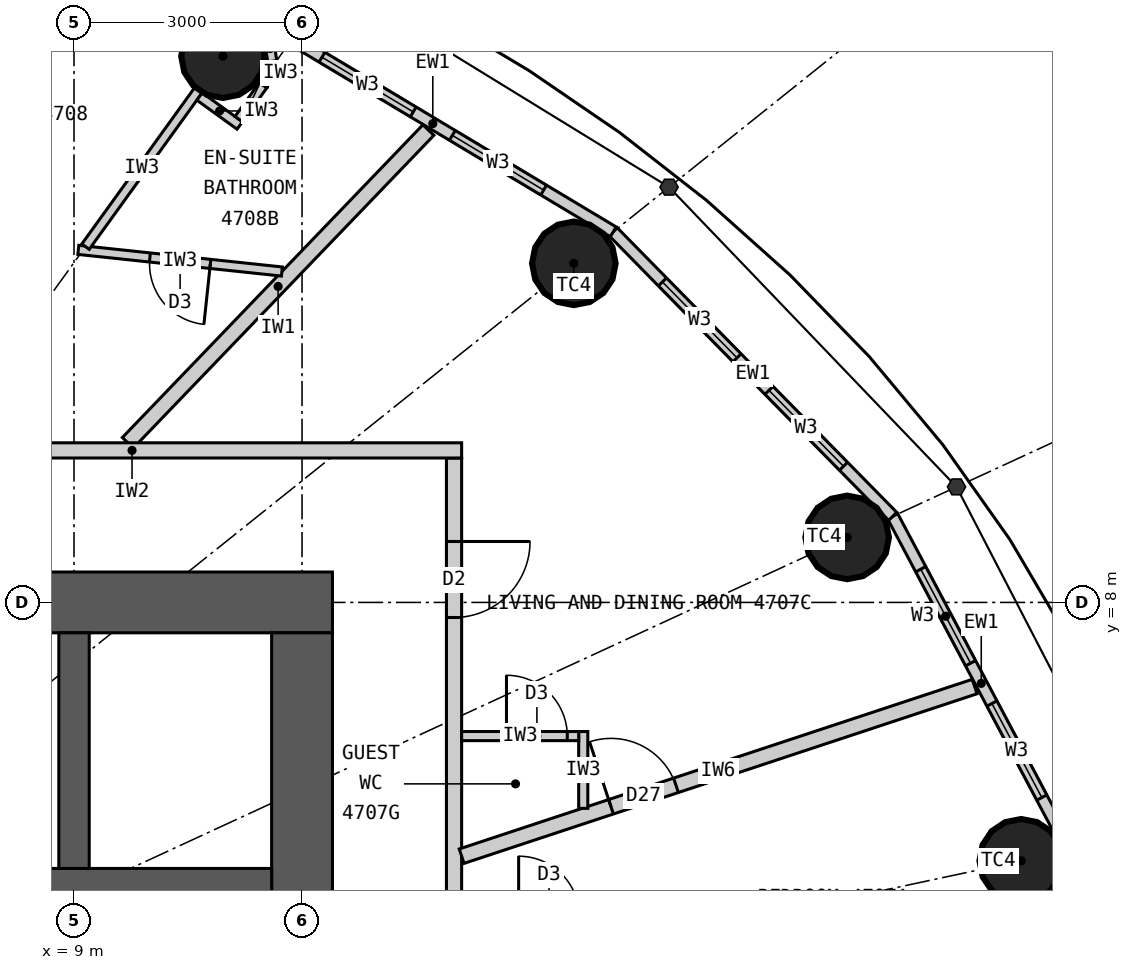
"""IFC4 building model, lengths in metres.
Left out: names, types, materials, properties, quantities, classifications, styles, units other than length and angle.
Written with IfcOpenShell. Run it as: python <this file> out.ifc"""

import sys

from ifc_helpers import new_model, si_unit, direction, frame, frame_2d, origin, origin_2d, place, context, subcontext, project, spatial, rectangle, circle, extrude, element, fill, save


model = new_model("IFC4")
c1 = context("Model", 3, precision=1e-05, world=origin(), true_north=direction((0.0, 1.0)))
c2 = subcontext(c1, "Body", "Model", "MODEL_VIEW")
j1 = project(units=[si_unit("LENGTHUNIT", "METRE"), si_unit("PLANEANGLEUNIT", "RADIAN")], contexts=[c1])
p1 = place(None, origin())
s1 = spatial("IfcSite", under=j1, at=p1, CompositionType="ELEMENT")
p2 = place(p1, origin())
s2 = spatial("IfcBuilding", under=s1, at=p2, CompositionType="ELEMENT")
p3 = place(p2, frame((0.0, 0.0, 176.4)))
s3 = spatial("IfcBuildingStorey", under=s2, at=p3, CompositionType="ELEMENT", Elevation=176.4)
for number, where, z_axis, x_axis in (
    (1, (21.463, 4.601, 0.0), (0.0, 0.0, 1.0), (1.0, 0.0, 0.0)),
    (2, (19.172, 8.855, 0.0), (0.0, 0.0, 1.0), (1.0, 0.0, 0.0)),
    (3, (15.576, 12.461, 0.0), (0.0, 0.0, 1.0), (1.0, 0.0, 0.0)),
    (4, (10.96, 15.186, 0.0), (0.0, 0.0, 1.0), (1.0, 0.0, 0.0)),
):
    element("IfcColumn", number, at=place(p3, frame(where, z_axis=z_axis, x_axis=x_axis)), inside=s3, PredefinedType="COLUMN", context=c2, shape_type="SweptSolid", body=[
        extrude(circle(Radius=0.55, at=origin_2d()), origin(), (0.0, 0.0, 1.0), 3.3),
    ])
p4 = place(p3, frame((-12.4, 8.0, 0.0), z_axis=(0.0, 0.0, 1.0), x_axis=(1.0, 0.0, 0.0)))
e5 = element("IfcWall", 5, at=p4, inside=s3, PredefinedType="SHEAR", context=c2, shape_type="SweptSolid", body=[
    extrude(rectangle(XDim=24.8, YDim=0.8, at=frame_2d((12.4, 0.0))), origin(), (0.0, 0.0, 1.0), 3.3),
])
p5 = place(p4, frame((11.1, 0.0, 0.0)))
e6 = element("IfcOpeningElement", 6, at=p5, cuts=e5, PredefinedType="OPENING", context=c2, shape_type="SweptSolid", body=[
    extrude(rectangle(XDim=1.2, YDim=2.2, at=frame_2d((0.6, 1.1))), frame((0.0, 0.41, 0.0), z_axis=(0.0, -1.0, 0.0), x_axis=(1.0, 0.0, 0.0)), (0.0, 0.0, 1.0), 0.82),
])
p6 = place(p4, frame((18.7, 0.0, 0.0)))
e7 = element("IfcOpeningElement", 7, at=p6, cuts=e5, PredefinedType="OPENING", context=c2, shape_type="SweptSolid", body=[
    extrude(rectangle(XDim=0.9, YDim=2.2, at=frame_2d((0.45, 1.1))), frame((0.0, 0.41, 0.0), z_axis=(0.0, -1.0, 0.0), x_axis=(1.0, 0.0, 0.0)), (0.0, 0.0, 1.0), 0.82),
])
p7 = place(p3, frame((12.0, -7.6, 0.0), z_axis=(0.0, 0.0, 1.0), x_axis=(0.0, 1.0, 0.0)))
e8 = element("IfcWall", 8, at=p7, inside=s3, PredefinedType="SHEAR", context=c2, shape_type="SweptSolid", body=[
    extrude(rectangle(XDim=15.2, YDim=0.8, at=frame_2d((7.6, 0.0))), origin(), (0.0, 0.0, 1.0), 3.3),
])
p8 = place(p7, frame((6.7, 0.0, 0.0)))
e9 = element("IfcOpeningElement", 9, at=p8, cuts=e8, PredefinedType="OPENING", context=c2, shape_type="SweptSolid", body=[
    extrude(rectangle(XDim=1.8, YDim=2.2, at=frame_2d((0.9, 1.1))), frame((0.0, 0.41, 0.0), z_axis=(0.0, -1.0, 0.0), x_axis=(1.0, 0.0, 0.0)), (0.0, 0.0, 1.0), 0.82),
])
p9 = place(p3, frame((-11.6, 4.3, 0.0), z_axis=(0.0, 0.0, 1.0), x_axis=(1.0, 0.0, 0.0)))
e10 = element("IfcWall", 10, at=p9, inside=s3, PredefinedType="SHEAR", context=c2, shape_type="SweptSolid", body=[
    extrude(rectangle(XDim=23.2, YDim=0.4, at=frame_2d((11.6, 0.0))), origin(), (0.0, 0.0, 1.0), 3.3),
])
p10 = place(p3, frame((9.0, 4.5, 0.0), z_axis=(0.0, 0.0, 1.0), x_axis=(0.0, 1.0, 0.0)))
e11 = element("IfcWall", 11, at=p10, inside=s3, PredefinedType="SHEAR", context=c2, shape_type="SweptSolid", body=[
    extrude(rectangle(XDim=3.1, YDim=0.4, at=frame_2d((1.55, 0.0))), origin(), (0.0, 0.0, 1.0), 3.3),
])
p11 = place(p3, frame((22.102, 4.738, 0.0), z_axis=(0.0, 0.0, 1.0), x_axis=(-0.468428906714, 0.883501193748, 0.0)))
e12 = element("IfcWall", 12, at=p11, inside=s3, PredefinedType="ELEMENTEDWALL", context=c2, shape_type="SweptSolid", body=[
    extrude(rectangle(XDim=4.974, YDim=0.15, at=frame_2d((2.487, 0.0))), origin(), (0.0, 0.0, 1.0), 3.12),
])
p12 = place(p11, frame((0.787, 0.0, 0.9)))
e13 = element("IfcOpeningElement", 13, at=p12, cuts=e12, PredefinedType="OPENING", context=c2, shape_type="SweptSolid", body=[
    extrude(rectangle(XDim=1.4, YDim=1.9, at=frame_2d((0.7, 0.95))), frame((0.0, 0.085, 0.0), z_axis=(0.0, -1.0, 0.0), x_axis=(1.0, 0.0, 0.0)), (0.0, 0.0, 1.0), 0.17),
])
p13 = place(p11, frame((2.787, 0.0, 0.9)))
e14 = element("IfcOpeningElement", 14, at=p13, cuts=e12, PredefinedType="OPENING", context=c2, shape_type="SweptSolid", body=[
    extrude(rectangle(XDim=1.4, YDim=1.9, at=frame_2d((0.7, 0.95))), frame((0.0, 0.085, 0.0), z_axis=(0.0, -1.0, 0.0), x_axis=(1.0, 0.0, 0.0)), (0.0, 0.0, 1.0), 0.17),
])
p14 = place(p3, frame((19.772, 9.132, 0.0), z_axis=(0.0, 0.0, 1.0), x_axis=(-0.700727467776, 0.71342905457, 0.0)))
e15 = element("IfcWall", 15, at=p14, inside=s3, PredefinedType="ELEMENTEDWALL", context=c2, shape_type="SweptSolid", body=[
    extrude(rectangle(XDim=5.247, YDim=0.15, at=frame_2d((2.624, 0.0))), origin(), (0.0, 0.0, 1.0), 3.12),
])
p15 = place(p14, frame((0.924, 0.0, 0.9)))
e16 = element("IfcOpeningElement", 16, at=p15, cuts=e15, PredefinedType="OPENING", context=c2, shape_type="SweptSolid", body=[
    extrude(rectangle(XDim=1.4, YDim=1.9, at=frame_2d((0.7, 0.95))), frame((0.0, 0.085, 0.0), z_axis=(0.0, -1.0, 0.0), x_axis=(1.0, 0.0, 0.0)), (0.0, 0.0, 1.0), 0.17),
])
p16 = place(p14, frame((2.924, 0.0, 0.9)))
e17 = element("IfcOpeningElement", 17, at=p16, cuts=e15, PredefinedType="OPENING", context=c2, shape_type="SweptSolid", body=[
    extrude(rectangle(XDim=1.4, YDim=1.9, at=frame_2d((0.7, 0.95))), frame((0.0, 0.085, 0.0), z_axis=(0.0, -1.0, 0.0), x_axis=(1.0, 0.0, 0.0)), (0.0, 0.0, 1.0), 0.17),
])
p17 = place(p3, frame((16.095, 12.876, 0.0), z_axis=(0.0, 0.0, 1.0), x_axis=(-0.857695199231, 0.514158482587, 0.0)))
e18 = element("IfcWall", 18, at=p17, inside=s3, PredefinedType="ELEMENTEDWALL", context=c2, shape_type="SweptSolid", body=[
    extrude(rectangle(XDim=5.536, YDim=0.15, at=frame_2d((2.768, 0.0))), origin(), (0.0, 0.0, 1.0), 3.12),
])
p18 = place(p17, frame((1.068, 0.0, 0.9)))
e19 = element("IfcOpeningElement", 19, at=p18, cuts=e18, PredefinedType="OPENING", context=c2, shape_type="SweptSolid", body=[
    extrude(rectangle(XDim=1.4, YDim=1.9, at=frame_2d((0.7, 0.95))), frame((0.0, 0.085, 0.0), z_axis=(0.0, -1.0, 0.0), x_axis=(1.0, 0.0, 0.0)), (0.0, 0.0, 1.0), 0.17),
])
p19 = place(p17, frame((3.068, 0.0, 0.9)))
e20 = element("IfcOpeningElement", 20, at=p19, cuts=e18, PredefinedType="OPENING", context=c2, shape_type="SweptSolid", body=[
    extrude(rectangle(XDim=1.4, YDim=1.9, at=frame_2d((0.7, 0.95))), frame((0.0, 0.085, 0.0), z_axis=(0.0, -1.0, 0.0), x_axis=(1.0, 0.0, 0.0)), (0.0, 0.0, 1.0), 0.17),
])
p20 = place(p3, frame((14.0, -9.9, 0.0), z_axis=(0.0, 0.0, 1.0), x_axis=(0.0, 1.0, 0.0)))
e21 = element("IfcWall", 21, at=p20, inside=s3, PredefinedType="PARTITIONING", context=c2, shape_type="SweptSolid", body=[
    extrude(rectangle(XDim=19.8, YDim=0.2, at=frame_2d((9.9, 0.0))), origin(), (0.0, 0.0, 1.0), 3.12),
])
p21 = place(p20, frame((4.268, 0.0, 0.0)))
e22 = element("IfcOpeningElement", 22, at=p21, cuts=e21, PredefinedType="OPENING", context=c2, shape_type="SweptSolid", body=[
    extrude(rectangle(XDim=1.0, YDim=2.2, at=frame_2d((0.5, 1.1))), frame((0.0, 0.11, 0.0), z_axis=(0.0, -1.0, 0.0), x_axis=(1.0, 0.0, 0.0)), (0.0, 0.0, 1.0), 0.22),
])
p22 = place(p20, frame((7.177, 0.0, 0.0)))
e23 = element("IfcOpeningElement", 23, at=p22, cuts=e21, PredefinedType="OPENING", context=c2, shape_type="SweptSolid", body=[
    extrude(rectangle(XDim=1.0, YDim=2.2, at=frame_2d((0.5, 1.1))), frame((0.0, 0.11, 0.0), z_axis=(0.0, -1.0, 0.0), x_axis=(1.0, 0.0, 0.0)), (0.0, 0.0, 1.0), 0.22),
])
p23 = place(p20, frame((17.701, 0.0, 0.0)))
e24 = element("IfcOpeningElement", 24, at=p23, cuts=e21, PredefinedType="OPENING", context=c2, shape_type="SweptSolid", body=[
    extrude(rectangle(XDim=1.0, YDim=2.2, at=frame_2d((0.5, 1.1))), frame((0.0, 0.11, 0.0), z_axis=(0.0, -1.0, 0.0), x_axis=(1.0, 0.0, 0.0)), (0.0, 0.0, 1.0), 0.22),
])
p24 = place(p3, frame((14.1, 4.661, 0.0), z_axis=(0.0, 0.0, 1.0), x_axis=(0.949453216399, 0.313908569285, 0.0)))
e25 = element("IfcWall", 25, at=p24, inside=s3, PredefinedType="PARTITIONING", context=c2, shape_type="SweptSolid", body=[
    extrude(rectangle(XDim=7.109, YDim=0.2, at=frame_2d((3.554, 0.0))), origin(), (0.0, 0.0, 1.0), 3.12),
])
p25 = place(p24, frame((2.07, 0.0, 0.0)))
e26 = element("IfcOpeningElement", 26, at=p25, cuts=e25, PredefinedType="OPENING", context=c2, shape_type="SweptSolid", body=[
    extrude(rectangle(XDim=0.9, YDim=2.1, at=frame_2d((0.45, 1.05))), frame((0.0, 0.11, 0.0), z_axis=(0.0, -1.0, 0.0), x_axis=(1.0, 0.0, 0.0)), (0.0, 0.0, 1.0), 0.22),
])
p26 = place(p3, frame((9.708, 10.1, 0.0), z_axis=(0.0, 0.0, 1.0), x_axis=(0.692978748441, 0.720958011405, 0.0)))
e27 = element("IfcWall", 27, at=p26, inside=s3, PredefinedType="PARTITIONING", context=c2, shape_type="SweptSolid", body=[
    extrude(rectangle(XDim=5.707, YDim=0.2, at=frame_2d((2.853, 0.0))), origin(), (0.0, 0.0, 1.0), 3.12),
])
p27 = place(p3, frame((15.7, 5.291, 0.0), z_axis=(0.0, 0.0, 1.0), x_axis=(0.0, 1.0, 0.0)))
e28 = element("IfcWall", 28, at=p27, inside=s3, PredefinedType="PARTITIONING", context=c2, shape_type="SweptSolid", body=[
    extrude(rectangle(XDim=1.011, YDim=0.12, at=frame_2d((0.505, 0.0))), origin(), (0.0, 0.0, 1.0), 3.12),
])
p28 = place(p3, frame((14.1, 6.241, 0.0), z_axis=(0.0, 0.0, 1.0), x_axis=(1.0, 0.0, 0.0)))
e29 = element("IfcWall", 29, at=p28, inside=s3, PredefinedType="PARTITIONING", context=c2, shape_type="SweptSolid", body=[
    extrude(rectangle(XDim=1.54, YDim=0.12, at=frame_2d((0.77, 0.0))), origin(), (0.0, 0.0, 1.0), 3.12),
])
p29 = place(p28, frame((0.59, 0.0, 0.0)))
e30 = element("IfcOpeningElement", 30, at=p29, cuts=e29, PredefinedType="OPENING", context=c2, shape_type="SweptSolid", body=[
    extrude(rectangle(XDim=0.8, YDim=2.1, at=frame_2d((0.4, 1.05))), frame((0.0, 0.07, 0.0), z_axis=(0.0, -1.0, 0.0), x_axis=(1.0, 0.0, 0.0)), (0.0, 0.0, 1.0), 0.14),
])
p30 = place(p3, frame((11.735, 12.353, 0.0), z_axis=(0.0, 0.0, 1.0), x_axis=(-0.994390130276, 0.105774613256, 0.0)))
e31 = element("IfcWall", 31, at=p30, inside=s3, PredefinedType="PARTITIONING", context=c2, shape_type="SweptSolid", body=[
    extrude(rectangle(XDim=2.694, YDim=0.12, at=frame_2d((1.347, 0.0))), origin(), (0.0, 0.0, 1.0), 3.12),
])
p31 = place(p30, frame((0.947, 0.0, 0.0)))
e32 = element("IfcOpeningElement", 32, at=p31, cuts=e31, PredefinedType="OPENING", context=c2, shape_type="SweptSolid", body=[
    extrude(rectangle(XDim=0.8, YDim=2.1, at=frame_2d((0.4, 1.05))), frame((0.0, 0.07, 0.0), z_axis=(0.0, -1.0, 0.0), x_axis=(1.0, 0.0, 0.0)), (0.0, 0.0, 1.0), 0.14),
])
p32 = place(p3, frame((9.151, 12.681, 0.0), z_axis=(0.0, 0.0, 1.0), x_axis=(0.585258912334, 0.8108464747, 0.0)))
e33 = element("IfcWall", 33, at=p32, inside=s3, PredefinedType="PARTITIONING", context=c2, shape_type="SweptSolid", body=[
    extrude(rectangle(XDim=2.54, YDim=0.12, at=frame_2d((1.27, 0.0))), origin(), (0.0, 0.0, 1.0), 2.42),
])
p33 = place(p3, frame((10.651, 14.656, 0.0), z_axis=(0.0, 0.0, 1.0), x_axis=(0.810916094797, -0.585162445137, 0.0)))
e34 = element("IfcWall", 34, at=p33, inside=s3, PredefinedType="PARTITIONING", context=c2, shape_type="SweptSolid", body=[
    extrude(rectangle(XDim=0.652, YDim=0.12, at=frame_2d((0.326, 0.0))), origin(), (0.0, 0.0, 1.0), 3.12),
])
p34 = place(p3, frame((11.167, 14.359, 0.0), z_axis=(0.0, 0.0, 1.0), x_axis=(0.585263549799, 0.810843127415, 0.0)))
e35 = element("IfcWall", 35, at=p34, inside=s3, PredefinedType="PARTITIONING", context=c2, shape_type="SweptSolid", body=[
    extrude(rectangle(XDim=0.55, YDim=0.12, at=frame_2d((0.275, 0.0))), origin(), (0.0, 0.0, 1.0), 3.12),
])
for number, where, z_axis, x_axis in (
    (36, (11.489, 14.804, 0.0), (0.0, 0.0, 1.0), (0.356, 0.935, 0.0)),
    (37, (11.609, 15.12, 0.0), (0.0, 0.0, 1.0), (-0.16, 0.987, 0.0)),
):
    element("IfcWall", number, at=place(p3, frame(where, z_axis=z_axis, x_axis=x_axis)), inside=s3, PredefinedType="PARTITIONING", context=c2, shape_type="SweptSolid", body=[
        extrude(rectangle(XDim=0.338, YDim=0.12, at=frame_2d((0.169, 0.0))), origin(), (0.0, 0.0, 1.0), 3.12),
    ])
p35 = place(p3, frame((5.427, 10.0, 0.0), z_axis=(0.0, 0.0, 1.0), x_axis=(1.0, 0.0, 0.0)))
e38 = element("IfcWall", 38, at=p35, inside=s3, PredefinedType="PARTITIONING", context=c2, shape_type="SweptSolid", body=[
    extrude(rectangle(XDim=8.673, YDim=0.2, at=frame_2d((4.337, 0.0))), origin(), (0.0, 0.0, 1.0), 3.12),
])
p36 = place(p35, frame((0.1, 0.0, 0.0)))
e39 = element("IfcOpeningElement", 39, at=p36, cuts=e38, PredefinedType="OPENING", context=c2, shape_type="SweptSolid", body=[
    extrude(rectangle(XDim=1.0, YDim=2.2, at=frame_2d((0.5, 1.1))), frame((0.0, 0.11, 0.0), z_axis=(0.0, -1.0, 0.0), x_axis=(1.0, 0.0, 0.0)), (0.0, 0.0, 1.0), 0.22),
])
p37 = place(p12, origin())
e40 = element("IfcWindow", 40, at=p37, inside=s3, PartitioningType="SINGLE_PANEL", PredefinedType="WINDOW", context=c2, shape_type="SweptSolid", body=[
    extrude(rectangle(XDim=1.4, YDim=1.9, at=frame_2d((0.7, 0.95))), frame((0.0, 0.03, 0.0), z_axis=(0.0, -1.0, 0.0), x_axis=(1.0, 0.0, 0.0)), (0.0, 0.0, 1.0), 0.06),
])
fill(e13, e40)
p38 = place(p13, origin())
e41 = element("IfcWindow", 41, at=p38, inside=s3, PartitioningType="SINGLE_PANEL", PredefinedType="WINDOW", context=c2, shape_type="SweptSolid", body=[
    extrude(rectangle(XDim=1.4, YDim=1.9, at=frame_2d((0.7, 0.95))), frame((0.0, 0.03, 0.0), z_axis=(0.0, -1.0, 0.0), x_axis=(1.0, 0.0, 0.0)), (0.0, 0.0, 1.0), 0.06),
])
fill(e14, e41)
p39 = place(p15, origin())
e42 = element("IfcWindow", 42, at=p39, inside=s3, PartitioningType="SINGLE_PANEL", PredefinedType="WINDOW", context=c2, shape_type="SweptSolid", body=[
    extrude(rectangle(XDim=1.4, YDim=1.9, at=frame_2d((0.7, 0.95))), frame((0.0, 0.03, 0.0), z_axis=(0.0, -1.0, 0.0), x_axis=(1.0, 0.0, 0.0)), (0.0, 0.0, 1.0), 0.06),
])
fill(e16, e42)
p40 = place(p16, origin())
e43 = element("IfcWindow", 43, at=p40, inside=s3, PartitioningType="SINGLE_PANEL", PredefinedType="WINDOW", context=c2, shape_type="SweptSolid", body=[
    extrude(rectangle(XDim=1.4, YDim=1.9, at=frame_2d((0.7, 0.95))), frame((0.0, 0.03, 0.0), z_axis=(0.0, -1.0, 0.0), x_axis=(1.0, 0.0, 0.0)), (0.0, 0.0, 1.0), 0.06),
])
fill(e17, e43)
p41 = place(p18, origin())
e44 = element("IfcWindow", 44, at=p41, inside=s3, PartitioningType="SINGLE_PANEL", PredefinedType="WINDOW", context=c2, shape_type="SweptSolid", body=[
    extrude(rectangle(XDim=1.4, YDim=1.9, at=frame_2d((0.7, 0.95))), frame((0.0, 0.03, 0.0), z_axis=(0.0, -1.0, 0.0), x_axis=(1.0, 0.0, 0.0)), (0.0, 0.0, 1.0), 0.06),
])
fill(e19, e44)
p42 = place(p19, origin())
e45 = element("IfcWindow", 45, at=p42, inside=s3, PartitioningType="SINGLE_PANEL", PredefinedType="WINDOW", context=c2, shape_type="SweptSolid", body=[
    extrude(rectangle(XDim=1.4, YDim=1.9, at=frame_2d((0.7, 0.95))), frame((0.0, 0.03, 0.0), z_axis=(0.0, -1.0, 0.0), x_axis=(1.0, 0.0, 0.0)), (0.0, 0.0, 1.0), 0.06),
])
fill(e20, e45)
p43 = place(p29, origin())
e46 = element("IfcDoor", 46, at=p43, inside=s3, OperationType="SINGLE_SWING_LEFT", PredefinedType="DOOR", context=c2, shape_type="SweptSolid", body=[
    extrude(rectangle(XDim=0.8, YDim=2.1, at=frame_2d((0.4, 1.05))), frame((0.0, 0.025, 0.0), z_axis=(0.0, -1.0, 0.0), x_axis=(1.0, 0.0, 0.0)), (0.0, 0.0, 1.0), 0.05),
])
fill(e30, e46)
p44 = place(p23, origin())
e47 = element("IfcDoor", 47, at=p44, inside=s3, OperationType="SINGLE_SWING_RIGHT", PredefinedType="DOOR", context=c2, shape_type="SweptSolid", body=[
    extrude(rectangle(XDim=1.0, YDim=2.2, at=frame_2d((0.5, 1.1))), frame((0.0, 0.025, 0.0), z_axis=(0.0, -1.0, 0.0), x_axis=(1.0, 0.0, 0.0)), (0.0, 0.0, 1.0), 0.05),
])
fill(e24, e47)
p45 = place(p25, origin())
e48 = element("IfcDoor", 48, at=p45, inside=s3, OperationType="SINGLE_SWING_LEFT", PredefinedType="DOOR", context=c2, shape_type="SweptSolid", body=[
    extrude(rectangle(XDim=0.9, YDim=2.1, at=frame_2d((0.45, 1.05))), frame((0.0, 0.025, 0.0), z_axis=(0.0, -1.0, 0.0), x_axis=(1.0, 0.0, 0.0)), (0.0, 0.0, 1.0), 0.05),
])
fill(e26, e48)
p46 = place(p31, origin())
e49 = element("IfcDoor", 49, at=p46, inside=s3, OperationType="SINGLE_SWING_LEFT", PredefinedType="DOOR", context=c2, shape_type="SweptSolid", body=[
    extrude(rectangle(XDim=0.8, YDim=2.1, at=frame_2d((0.4, 1.05))), frame((0.0, 0.025, 0.0), z_axis=(0.0, -1.0, 0.0), x_axis=(1.0, 0.0, 0.0)), (0.0, 0.0, 1.0), 0.05),
])
fill(e32, e49)
save(model, sys.argv[1])
